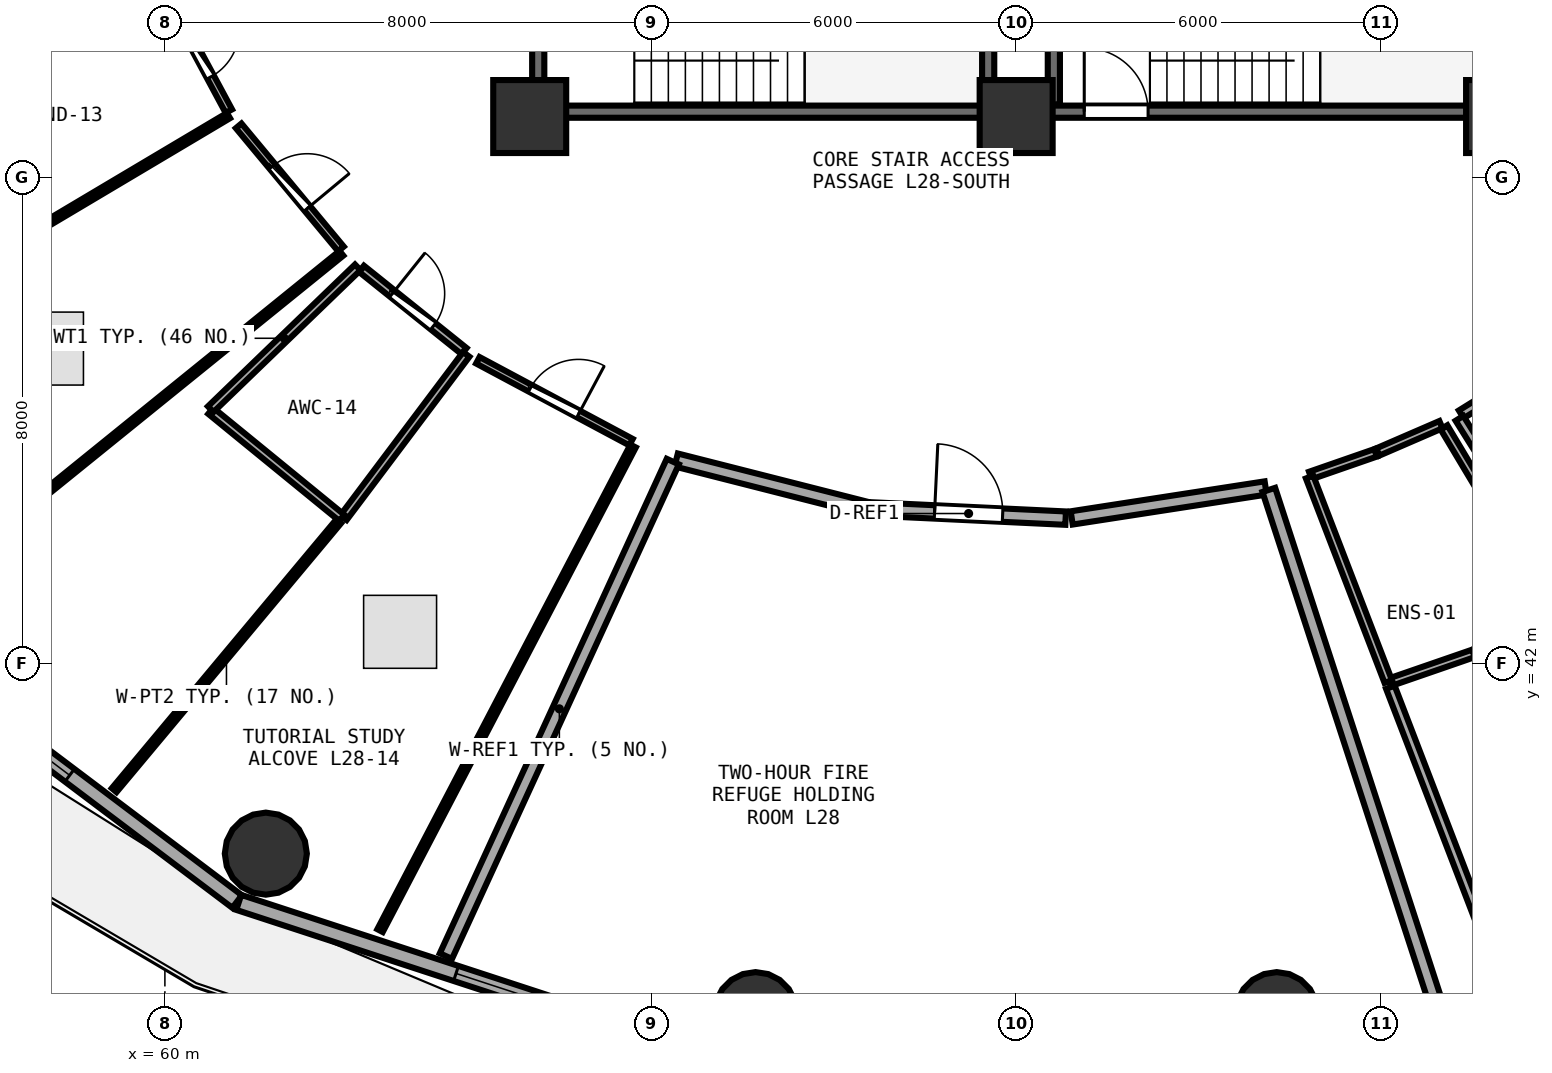
"""IFC4 building model, lengths in metres.
Left out: names, types, materials, properties, quantities, classifications, styles, units other than length and angle.
Written with IfcOpenShell. Run it as: python <this file> out.ifc"""

import sys

from ifc_helpers import new_model, si_unit, direction, frame, frame_2d, origin, origin_2d, place, context, subcontext, project, spatial, rectangle, circle, extrude, element, fill, save


model = new_model("IFC4")
c1 = context("Model", 3, precision=1e-05, world=origin(), true_north=direction((0.0, 1.0)))
c2 = subcontext(c1, "Body", "Model", "MODEL_VIEW")
j1 = project(units=[si_unit("LENGTHUNIT", "METRE"), si_unit("PLANEANGLEUNIT", "RADIAN")], contexts=[c1])
p1 = place(None, origin())
s1 = spatial("IfcSite", under=j1, at=p1, CompositionType="ELEMENT")
p2 = place(p1, origin())
s2 = spatial("IfcBuilding", under=s1, at=p2, CompositionType="ELEMENT")
p3 = place(p2, frame((0.0, 0.0, 110.1)))
s3 = spatial("IfcBuildingStorey", under=s2, at=p3, CompositionType="ELEMENT", Elevation=110.1)
for number, where, z_axis, x_axis in (
    (1, (66.0, 51.0, 0.0), (0.0, 0.0, 1.0), (1.0, 0.0, 0.0)),
    (2, (74.0, 51.0, 0.0), (0.0, 0.0, 1.0), (1.0, 0.0, 0.0)),
    (3, (82.0, 51.0, 0.0), (0.0, 0.0, 1.0), (1.0, 0.0, 0.0)),
):
    element("IfcColumn", number, at=place(p3, frame(where, z_axis=z_axis, x_axis=x_axis)), inside=s3, PredefinedType="PILASTER", context=c2, shape_type="SweptSolid", body=[
        extrude(rectangle(XDim=1.2, YDim=1.2, at=origin_2d()), origin(), (0.0, 0.0, 1.0), 3.75),
    ])
for number, where, z_axis, x_axis in (
    (4, (61.66, 38.878, 0.0), (0.0, 0.0, 1.0), (1.0, 0.0, 0.0)),
    (5, (69.714, 36.255, 0.0), (0.0, 0.0, 1.0), (1.0, 0.0, 0.0)),
    (6, (78.286, 36.255, 0.0), (0.0, 0.0, 1.0), (1.0, 0.0, 0.0)),
):
    element("IfcColumn", number, at=place(p3, frame(where, z_axis=z_axis, x_axis=x_axis)), inside=s3, PredefinedType="COLUMN", context=c2, shape_type="SweptSolid", body=[
        extrude(circle(Radius=0.675, at=origin_2d()), origin(), (0.0, 0.0, 1.0), 3.75),
    ])
p4 = place(p3, frame((54.401, 43.207, 0.0), z_axis=(0.0, 0.0, 1.0), x_axis=(0.798501507879, -0.601992808857, 0.0)))
e7 = element("IfcWall", 7, at=p4, inside=s3, PredefinedType="SOLIDWALL", context=c2, shape_type="SweptSolid", body=[
    extrude(rectangle(XDim=8.499, YDim=0.26, at=frame_2d((4.25, 0.0))), origin(), (0.0, 0.0, 1.0), 3.475),
])
p5 = place(p4, frame((3.45, 0.0, 0.85)))
e8 = element("IfcOpeningElement", 8, at=p5, cuts=e7, PredefinedType="OPENING", context=c2, shape_type="SweptSolid", body=[
    extrude(rectangle(XDim=1.6, YDim=1.45, at=frame_2d((0.8, 0.725))), frame((0.0, 0.14, 0.0), z_axis=(0.0, -1.0, 0.0), x_axis=(1.0, 0.0, 0.0)), (0.0, 0.0, 1.0), 0.28),
])
p6 = place(p3, frame((61.214, 38.077, 0.0), z_axis=(0.0, 0.0, 1.0), x_axis=(0.950471101963, -0.310812941064, 0.0)))
e9 = element("IfcWall", 9, at=p6, inside=s3, PredefinedType="SOLIDWALL", context=c2, shape_type="SweptSolid", body=[
    extrude(rectangle(XDim=8.76, YDim=0.26, at=frame_2d((4.38, 0.0))), origin(), (0.0, 0.0, 1.0), 3.475),
])
p7 = place(p6, frame((3.76, 0.0, 0.85)))
e10 = element("IfcOpeningElement", 10, at=p7, cuts=e9, PredefinedType="OPENING", context=c2, shape_type="SweptSolid", body=[
    extrude(rectangle(XDim=1.6, YDim=1.45, at=frame_2d((0.8, 0.725))), frame((0.0, 0.14, 0.0), z_axis=(0.0, -1.0, 0.0), x_axis=(1.0, 0.0, 0.0)), (0.0, 0.0, 1.0), 0.28),
])
p8 = place(p3, frame((74.0, 51.08, 0.0), z_axis=(0.0, 0.0, 1.0), x_axis=(1.0, 0.0, 0.0)))
e11 = element("IfcWall", 11, at=p8, inside=s3, PredefinedType="SHEAR", context=c2, shape_type="SweptSolid", body=[
    extrude(rectangle(XDim=7.9, YDim=0.2, at=frame_2d((3.95, 0.0))), origin(), (0.0, 0.0, 1.0), 3.49),
])
p9 = place(p8, frame((1.12, 0.0, 0.0)))
e12 = element("IfcOpeningElement", 12, at=p9, cuts=e11, PredefinedType="OPENING", context=c2, shape_type="SweptSolid", body=[
    extrude(rectangle(XDim=1.05, YDim=2.1, at=frame_2d((0.525, 1.05))), frame((0.0, 0.11, 0.0), z_axis=(0.0, -1.0, 0.0), x_axis=(1.0, 0.0, 0.0)), (0.0, 0.0, 1.0), 0.22),
])
p10 = place(p3, frame((74.62, 54.27, 0.0), z_axis=(0.0, 0.0, 1.0), x_axis=(0.0, -1.0, 0.0)))
e13 = element("IfcWall", 13, at=p10, inside=s3, PredefinedType="SHEAR", context=c2, shape_type="SweptSolid", body=[
    extrude(rectangle(XDim=3.07, YDim=0.2, at=frame_2d((1.535, 0.0))), origin(), (0.0, 0.0, 1.0), 3.49),
])
p11 = place(p3, frame((66.26, 51.08, 0.0), z_axis=(0.0, 0.0, 1.0), x_axis=(1.0, 0.0, 0.0)))
e14 = element("IfcWall", 14, at=p11, inside=s3, PredefinedType="SHEAR", context=c2, shape_type="SweptSolid", body=[
    extrude(rectangle(XDim=7.16, YDim=0.2, at=frame_2d((3.58, 0.0))), origin(), (0.0, 0.0, 1.0), 3.49),
])
p12 = place(p3, frame((73.54, 51.2, 0.0), z_axis=(0.0, 0.0, 1.0), x_axis=(0.0, 1.0, 0.0)))
e15 = element("IfcWall", 15, at=p12, inside=s3, PredefinedType="SHEAR", context=c2, shape_type="SweptSolid", body=[
    extrude(rectangle(XDim=3.07, YDim=0.2, at=frame_2d((1.535, 0.0))), origin(), (0.0, 0.0, 1.0), 3.49),
])
p13 = place(p3, frame((66.14, 54.27, 0.0), z_axis=(0.0, 0.0, 1.0), x_axis=(0.0, -1.0, 0.0)))
e16 = element("IfcWall", 16, at=p13, inside=s3, PredefinedType="SHEAR", context=c2, shape_type="SweptSolid", body=[
    extrude(rectangle(XDim=3.07, YDim=0.2, at=frame_2d((1.535, 0.0))), origin(), (0.0, 0.0, 1.0), 3.49),
])
p14 = place(p13, frame((1.01, 0.0, 0.0)))
e17 = element("IfcOpeningElement", 17, at=p14, cuts=e16, PredefinedType="OPENING", context=c2, shape_type="SweptSolid", body=[
    extrude(rectangle(XDim=1.05, YDim=2.1, at=frame_2d((0.525, 1.05))), frame((0.0, 0.11, 0.0), z_axis=(0.0, -1.0, 0.0), x_axis=(1.0, 0.0, 0.0)), (0.0, 0.0, 1.0), 0.22),
])
p15 = place(p3, frame((71.622, 44.547, 0.0), z_axis=(0.0, 0.0, 1.0), x_axis=(0.998877795438, -0.0473619022, 0.0)))
e18 = element("IfcWall", 18, at=p15, inside=s3, PredefinedType="SOLIDWALL", context=c2, shape_type="SweptSolid", body=[
    extrude(rectangle(XDim=3.196, YDim=0.22, at=frame_2d((1.598, 0.0))), origin(), (0.0, 0.0, 1.0), 3.48),
])
p16 = place(p15, frame((1.038, 0.0, 0.0)))
e19 = element("IfcOpeningElement", 19, at=p16, cuts=e18, PredefinedType="OPENING", context=c2, shape_type="SweptSolid", body=[
    extrude(rectangle(XDim=1.12, YDim=2.1, at=frame_2d((0.56, 1.05))), frame((0.0, 0.12, 0.0), z_axis=(0.0, -1.0, 0.0), x_axis=(1.0, 0.0, 0.0)), (0.0, 0.0, 1.0), 0.24),
])
p17 = place(p3, frame((81.036, 45.889, 0.0), z_axis=(0.0, 0.0, 1.0), x_axis=(0.513583206277, -0.858039795249, 0.0)))
e20 = element("IfcWall", 20, at=p17, inside=s3, PredefinedType="PLUMBINGWALL", context=c2, shape_type="SweptSolid", body=[
    extrude(rectangle(XDim=3.581, YDim=0.13, at=frame_2d((1.791, 0.0))), origin(), (0.0, 0.0, 1.0), 3.175),
])
p18 = place(p17, frame((1.361, 0.0, 0.0)))
e21 = element("IfcOpeningElement", 21, at=p18, cuts=e20, PredefinedType="OPENING", context=c2, shape_type="SweptSolid", body=[
    extrude(rectangle(XDim=0.86, YDim=2.05, at=frame_2d((0.43, 1.025))), frame((0.0, 0.075, 0.0), z_axis=(0.0, -1.0, 0.0), x_axis=(1.0, 0.0, 0.0)), (0.0, 0.0, 1.0), 0.15),
])
p19 = place(p3, frame((81.321, 46.103, 0.0), z_axis=(0.0, 0.0, 1.0), x_axis=(0.849017842519, 0.528364176572, 0.0)))
e22 = element("IfcWall", 22, at=p19, inside=s3, PredefinedType="PARTITIONING", context=c2, shape_type="SweptSolid", body=[
    extrude(rectangle(XDim=2.7, YDim=0.15, at=frame_2d((1.35, 0.0))), origin(), (0.0, 0.0, 1.0), 2.925),
])
p20 = place(p19, frame((0.875, 0.0, 0.0)))
e23 = element("IfcOpeningElement", 23, at=p20, cuts=e22, PredefinedType="OPENING", context=c2, shape_type="SweptSolid", body=[
    extrude(rectangle(XDim=0.95, YDim=2.08, at=frame_2d((0.475, 1.04))), frame((0.0, 0.085, 0.0), z_axis=(0.0, -1.0, 0.0), x_axis=(1.0, 0.0, 0.0)), (0.0, 0.0, 1.0), 0.17),
])
p21 = place(p3, frame((60.022, 53.002, 0.0), z_axis=(0.0, 0.0, 1.0), x_axis=(0.473670876771, -0.880701936241, 0.0)))
e24 = element("IfcWall", 24, at=p21, inside=s3, PredefinedType="PARTITIONING", context=c2, shape_type="SweptSolid", body=[
    extrude(rectangle(XDim=2.173, YDim=0.12, at=frame_2d((1.086, 0.0))), origin(), (0.0, 0.0, 1.0), 3.235),
])
p22 = place(p21, frame((0.636, 0.0, 0.0)))
e25 = element("IfcOpeningElement", 25, at=p22, cuts=e24, PredefinedType="OPENING", context=c2, shape_type="SweptSolid", body=[
    extrude(rectangle(XDim=0.9, YDim=2.08, at=frame_2d((0.45, 1.04))), frame((0.0, 0.07, 0.0), z_axis=(0.0, -1.0, 0.0), x_axis=(1.0, 0.0, 0.0)), (0.0, 0.0, 1.0), 0.14),
])
p23 = place(p3, frame((61.213, 50.847, 0.0), z_axis=(0.0, 0.0, 1.0), x_axis=(0.639180120379, -0.769057067916, 0.0)))
e26 = element("IfcWall", 26, at=p23, inside=s3, PredefinedType="PARTITIONING", context=c2, shape_type="SweptSolid", body=[
    extrude(rectangle(XDim=2.632, YDim=0.12, at=frame_2d((1.316, 0.0))), origin(), (0.0, 0.0, 1.0), 2.925),
])
p24 = place(p23, frame((0.866, 0.0, 0.0)))
e27 = element("IfcOpeningElement", 27, at=p24, cuts=e26, PredefinedType="OPENING", context=c2, shape_type="SweptSolid", body=[
    extrude(rectangle(XDim=0.9, YDim=2.08, at=frame_2d((0.45, 1.04))), frame((0.0, 0.07, 0.0), z_axis=(0.0, -1.0, 0.0), x_axis=(1.0, 0.0, 0.0)), (0.0, 0.0, 1.0), 0.14),
])
p25 = place(p3, frame((63.233, 48.497, 0.0), z_axis=(0.0, 0.0, 1.0), x_axis=(0.780097789407, -0.625657605214, 0.0)))
e28 = element("IfcWall", 28, at=p25, inside=s3, PredefinedType="PLUMBINGWALL", context=c2, shape_type="SweptSolid", body=[
    extrude(rectangle(XDim=2.164, YDim=0.13, at=frame_2d((1.082, 0.0))), origin(), (0.0, 0.0, 1.0), 2.925),
])
p26 = place(p25, frame((0.652, 0.0, 0.0)))
e29 = element("IfcOpeningElement", 29, at=p26, cuts=e28, PredefinedType="OPENING", context=c2, shape_type="SweptSolid", body=[
    extrude(rectangle(XDim=0.86, YDim=2.05, at=frame_2d((0.43, 1.025))), frame((0.0, 0.075, 0.0), z_axis=(0.0, -1.0, 0.0), x_axis=(1.0, 0.0, 0.0)), (0.0, 0.0, 1.0), 0.15),
])
p27 = place(p3, frame((65.147, 46.992, 0.0), z_axis=(0.0, 0.0, 1.0), x_axis=(0.881924316784, -0.471391026077, 0.0)))
e30 = element("IfcWall", 30, at=p27, inside=s3, PredefinedType="PARTITIONING", context=c2, shape_type="SweptSolid", body=[
    extrude(rectangle(XDim=2.856, YDim=0.12, at=frame_2d((1.428, 0.0))), origin(), (0.0, 0.0, 1.0), 2.925),
])
p28 = place(p27, frame((0.978, 0.0, 0.0)))
e31 = element("IfcOpeningElement", 31, at=p28, cuts=e30, PredefinedType="OPENING", context=c2, shape_type="SweptSolid", body=[
    extrude(rectangle(XDim=0.9, YDim=2.08, at=frame_2d((0.45, 1.04))), frame((0.0, 0.07, 0.0), z_axis=(0.0, -1.0, 0.0), x_axis=(1.0, 0.0, 0.0)), (0.0, 0.0, 1.0), 0.14),
])
p29 = place(p3, frame((68.409, 45.352, 0.0), z_axis=(0.0, 0.0, 1.0), x_axis=(0.969137775127, -0.24651972096, 0.0)))
e32 = element("IfcWall", 32, at=p29, inside=s3, PredefinedType="SOLIDWALL", context=c2, shape_type="SweptSolid", body=[
    extrude(rectangle(XDim=3.214, YDim=0.22, at=frame_2d((1.607, 0.0))), origin(), (0.0, 0.0, 1.0), 3.235),
])
p30 = place(p3, frame((74.914, 44.399, 0.0), z_axis=(0.0, 0.0, 1.0), x_axis=(0.988282336333, 0.152636901479, 0.0)))
e33 = element("IfcWall", 33, at=p30, inside=s3, PredefinedType="SOLIDWALL", context=c2, shape_type="SweptSolid", body=[
    extrude(rectangle(XDim=3.228, YDim=0.22, at=frame_2d((1.614, 0.0))), origin(), (0.0, 0.0, 1.0), 3.48),
])
p31 = place(p3, frame((78.156, 44.86, 0.0), z_axis=(0.0, 0.0, 1.0), x_axis=(0.309595310809, -0.950868415463, 0.0)))
e34 = element("IfcWall", 34, at=p31, inside=s3, PredefinedType="SOLIDWALL", context=c2, shape_type="SweptSolid", body=[
    extrude(rectangle(XDim=8.867, YDim=0.22, at=frame_2d((4.433, 0.0))), origin(), (0.0, 0.0, 1.0), 2.925),
])
p32 = place(p3, frame((64.622, 37.193, 0.0), z_axis=(0.0, 0.0, 1.0), x_axis=(0.417058666801, 0.908879567625, 0.0)))
e35 = element("IfcWall", 35, at=p32, inside=s3, PredefinedType="SOLIDWALL", context=c2, shape_type="SweptSolid", body=[
    extrude(rectangle(XDim=8.948, YDim=0.22, at=frame_2d((4.474, 0.0))), origin(), (0.0, 0.0, 1.0), 2.925),
])
p33 = place(p3, frame((78.838, 45.097, 0.0), z_axis=(0.0, 0.0, 1.0), x_axis=(0.94463296612, 0.328128876084, 0.0)))
e36 = element("IfcWall", 36, at=p33, inside=s3, PredefinedType="PLUMBINGWALL", context=c2, shape_type="SweptSolid", body=[
    extrude(rectangle(XDim=1.136, YDim=0.13, at=frame_2d((0.568, 0.0))), origin(), (0.0, 0.0, 1.0), 3.235),
])
p34 = place(p3, frame((79.948, 45.484, 0.0), z_axis=(0.0, 0.0, 1.0), x_axis=(0.917754995973, 0.397147034946, 0.0)))
e37 = element("IfcWall", 37, at=p34, inside=s3, PredefinedType="PLUMBINGWALL", context=c2, shape_type="SweptSolid", body=[
    extrude(rectangle(XDim=1.131, YDim=0.13, at=frame_2d((0.565, 0.0))), origin(), (0.0, 0.0, 1.0), 2.925),
])
p35 = place(p3, frame((81.521, 42.171, 0.0), z_axis=(0.0, 0.0, 1.0), x_axis=(-0.94522127907, -0.326430289025, 0.0)))
e38 = element("IfcWall", 38, at=p35, inside=s3, PredefinedType="PLUMBINGWALL", context=c2, shape_type="SweptSolid", body=[
    extrude(rectangle(XDim=1.455, YDim=0.13, at=frame_2d((0.727, 0.0))), origin(), (0.0, 0.0, 1.0), 3.48),
])
p36 = place(p3, frame((80.12, 41.709, 0.0), z_axis=(0.0, 0.0, 1.0), x_axis=(-0.359078976073, 0.933307178233, 0.0)))
e39 = element("IfcWall", 39, at=p36, inside=s3, PredefinedType="PLUMBINGWALL", context=c2, shape_type="SweptSolid", body=[
    extrude(rectangle(XDim=3.603, YDim=0.13, at=frame_2d((1.801, 0.0))), origin(), (0.0, 0.0, 1.0), 2.925),
])
p37 = place(p3, frame((82.027, 36.744, 0.0), z_axis=(0.0, 0.0, 1.0), x_axis=(-0.358828576498, 0.933403477971, 0.0)))
e40 = element("IfcWall", 40, at=p37, inside=s3, PredefinedType="PARTITIONING", context=c2, shape_type="SweptSolid", body=[
    extrude(rectangle(XDim=5.218, YDim=0.15, at=frame_2d((2.609, 0.0))), origin(), (0.0, 0.0, 1.0), 2.975),
])
p38 = place(p3, frame((81.996, 44.913, 0.0), z_axis=(0.0, 0.0, 1.0), x_axis=(-0.53138752038, 0.847128858666, 0.0)))
e41 = element("IfcWall", 41, at=p38, inside=s3, PredefinedType="PARTITIONING", context=c2, shape_type="SweptSolid", body=[
    extrude(rectangle(XDim=1.327, YDim=0.15, at=frame_2d((0.664, 0.0))), origin(), (0.0, 0.0, 1.0), 3.235),
])
p39 = place(p3, frame((59.827, 53.355, 0.0), z_axis=(0.0, 0.0, 1.0), x_axis=(-0.952909703193, -0.30325417979, 0.0)))
e42 = element("IfcWall", 42, at=p39, inside=s3, PredefinedType="PARTITIONING", context=c2, shape_type="SweptSolid", body=[
    extrude(rectangle(XDim=8.776, YDim=0.1, at=frame_2d((4.388, 0.0))), origin(), (0.0, 0.0, 1.0), 3.175),
])
p40 = place(p3, frame((61.046, 51.016, 0.0), z_axis=(0.0, 0.0, 1.0), x_axis=(-0.859598985467, -0.510969259529, 0.0)))
e43 = element("IfcWall", 43, at=p40, inside=s3, PredefinedType="PARTITIONING", context=c2, shape_type="SweptSolid", body=[
    extrude(rectangle(XDim=3.721, YDim=0.1, at=frame_2d((1.86, 0.0))), origin(), (0.0, 0.0, 1.0), 2.925),
])
p41 = place(p3, frame((56.49, 51.691, 0.0), z_axis=(0.0, 0.0, 1.0), x_axis=(0.931912263443, 0.362683792365, 0.0)))
e44 = element("IfcWall", 44, at=p41, inside=s3, PredefinedType="PARTITIONING", context=c2, shape_type="SweptSolid", body=[
    extrude(rectangle(XDim=3.72, YDim=0.1, at=frame_2d((1.86, 0.0))), origin(), (0.0, 0.0, 1.0), 3.175),
])
p42 = place(p3, frame((62.903, 48.752, 0.0), z_axis=(0.0, 0.0, 1.0), x_axis=(-0.777323765608, -0.629100757766, 0.0)))
e45 = element("IfcWall", 45, at=p42, inside=s3, PredefinedType="PARTITIONING", context=c2, shape_type="SweptSolid", body=[
    extrude(rectangle(XDim=9.44, YDim=0.1, at=frame_2d((4.72, 0.0))), origin(), (0.0, 0.0, 1.0), 2.925),
])
p43 = place(p3, frame((64.956, 47.089, 0.0), z_axis=(0.0, 0.0, 1.0), x_axis=(-0.600999501428, -0.799249397425, 0.0)))
e46 = element("IfcWall", 46, at=p43, inside=s3, PredefinedType="PLUMBINGWALL", context=c2, shape_type="SweptSolid", body=[
    extrude(rectangle(XDim=3.359, YDim=0.13, at=frame_2d((1.68, 0.0))), origin(), (0.0, 0.0, 1.0), 2.925),
])
p44 = place(p3, frame((62.909, 44.401, 0.0), z_axis=(0.0, 0.0, 1.0), x_axis=(-0.774562936157, 0.632496844207, 0.0)))
e47 = element("IfcWall", 47, at=p44, inside=s3, PredefinedType="PLUMBINGWALL", context=c2, shape_type="SweptSolid", body=[
    extrude(rectangle(XDim=2.782, YDim=0.13, at=frame_2d((1.391, 0.0))), origin(), (0.0, 0.0, 1.0), 3.48),
])
p45 = place(p3, frame((60.753, 46.187, 0.0), z_axis=(0.0, 0.0, 1.0), x_axis=(0.719671825867, 0.694314383441, 0.0)))
e48 = element("IfcWall", 48, at=p45, inside=s3, PredefinedType="PLUMBINGWALL", context=c2, shape_type="SweptSolid", body=[
    extrude(rectangle(XDim=3.36, YDim=0.13, at=frame_2d((1.68, 0.0))), origin(), (0.0, 0.0, 1.0), 3.235),
])
p46 = place(p3, frame((67.7, 45.582, 0.0), z_axis=(0.0, 0.0, 1.0), x_axis=(-0.462926984727, -0.88639641629, 0.0)))
e49 = element("IfcWall", 49, at=p46, inside=s3, PredefinedType="PARTITIONING", context=c2, shape_type="SweptSolid", body=[
    extrude(rectangle(XDim=8.99, YDim=0.1, at=frame_2d((4.495, 0.0))), origin(), (0.0, 0.0, 1.0), 2.925),
])
p47 = place(p3, frame((59.166, 39.922, 0.0), z_axis=(0.0, 0.0, 1.0), x_axis=(0.641042435707, 0.767505436869, 0.0)))
e50 = element("IfcWall", 50, at=p47, inside=s3, PredefinedType="PARTITIONING", context=c2, shape_type="SweptSolid", body=[
    extrude(rectangle(XDim=5.763, YDim=0.1, at=frame_2d((2.881, 0.0))), origin(), (0.0, 0.0, 1.0), 2.975),
])
p48 = place(p5, origin())
e51 = element("IfcWindow", 51, at=p48, inside=s3, PartitioningType="SINGLE_PANEL", PredefinedType="WINDOW", context=c2, shape_type="SweptSolid", body=[
    extrude(rectangle(XDim=1.6, YDim=1.45, at=frame_2d((0.8, 0.725))), frame((0.0, 0.03, 0.0), z_axis=(0.0, -1.0, 0.0), x_axis=(1.0, 0.0, 0.0)), (0.0, 0.0, 1.0), 0.06),
])
fill(e8, e51)
p49 = place(p7, origin())
e52 = element("IfcWindow", 52, at=p49, inside=s3, PartitioningType="SINGLE_PANEL", PredefinedType="WINDOW", context=c2, shape_type="SweptSolid", body=[
    extrude(rectangle(XDim=1.6, YDim=1.45, at=frame_2d((0.8, 0.725))), frame((0.0, 0.03, 0.0), z_axis=(0.0, -1.0, 0.0), x_axis=(1.0, 0.0, 0.0)), (0.0, 0.0, 1.0), 0.06),
])
fill(e10, e52)
p50 = place(p9, origin())
e53 = element("IfcDoor", 53, at=p50, inside=s3, OperationType="SINGLE_SWING_LEFT", PredefinedType="DOOR", context=c2, shape_type="SweptSolid", body=[
    extrude(rectangle(XDim=1.05, YDim=2.1, at=frame_2d((0.525, 1.05))), frame((0.0, 0.025, 0.0), z_axis=(0.0, -1.0, 0.0), x_axis=(1.0, 0.0, 0.0)), (0.0, 0.0, 1.0), 0.05),
])
fill(e12, e53)
p51 = place(p16, origin())
e54 = element("IfcDoor", 54, at=p51, inside=s3, OperationType="SINGLE_SWING_LEFT", PredefinedType="DOOR", context=c2, shape_type="SweptSolid", body=[
    extrude(rectangle(XDim=1.12, YDim=2.1, at=frame_2d((0.56, 1.05))), frame((0.0, 0.025, 0.0), z_axis=(0.0, -1.0, 0.0), x_axis=(1.0, 0.0, 0.0)), (0.0, 0.0, 1.0), 0.05),
])
fill(e19, e54)
p52 = place(p22, origin())
e55 = element("IfcDoor", 55, at=p52, inside=s3, OperationType="SINGLE_SWING_LEFT", PredefinedType="DOOR", context=c2, shape_type="SweptSolid", body=[
    extrude(rectangle(XDim=0.9, YDim=2.08, at=frame_2d((0.45, 1.04))), frame((0.0, 0.025, 0.0), z_axis=(0.0, -1.0, 0.0), x_axis=(1.0, 0.0, 0.0)), (0.0, 0.0, 1.0), 0.05),
])
fill(e25, e55)
p53 = place(p24, origin())
e56 = element("IfcDoor", 56, at=p53, inside=s3, OperationType="SINGLE_SWING_RIGHT", PredefinedType="DOOR", context=c2, shape_type="SweptSolid", body=[
    extrude(rectangle(XDim=0.9, YDim=2.08, at=frame_2d((0.45, 1.04))), frame((0.0, 0.025, 0.0), z_axis=(0.0, -1.0, 0.0), x_axis=(1.0, 0.0, 0.0)), (0.0, 0.0, 1.0), 0.05),
])
fill(e27, e56)
p54 = place(p26, origin())
e57 = element("IfcDoor", 57, at=p54, inside=s3, OperationType="SINGLE_SWING_LEFT", PredefinedType="DOOR", context=c2, shape_type="SweptSolid", body=[
    extrude(rectangle(XDim=0.86, YDim=2.05, at=frame_2d((0.43, 1.025))), frame((0.0, 0.025, 0.0), z_axis=(0.0, -1.0, 0.0), x_axis=(1.0, 0.0, 0.0)), (0.0, 0.0, 1.0), 0.05),
])
fill(e29, e57)
p55 = place(p28, origin())
e58 = element("IfcDoor", 58, at=p55, inside=s3, OperationType="SINGLE_SWING_RIGHT", PredefinedType="DOOR", context=c2, shape_type="SweptSolid", body=[
    extrude(rectangle(XDim=0.9, YDim=2.08, at=frame_2d((0.45, 1.04))), frame((0.0, 0.025, 0.0), z_axis=(0.0, -1.0, 0.0), x_axis=(1.0, 0.0, 0.0)), (0.0, 0.0, 1.0), 0.05),
])
fill(e31, e58)
save(model, sys.argv[1])
